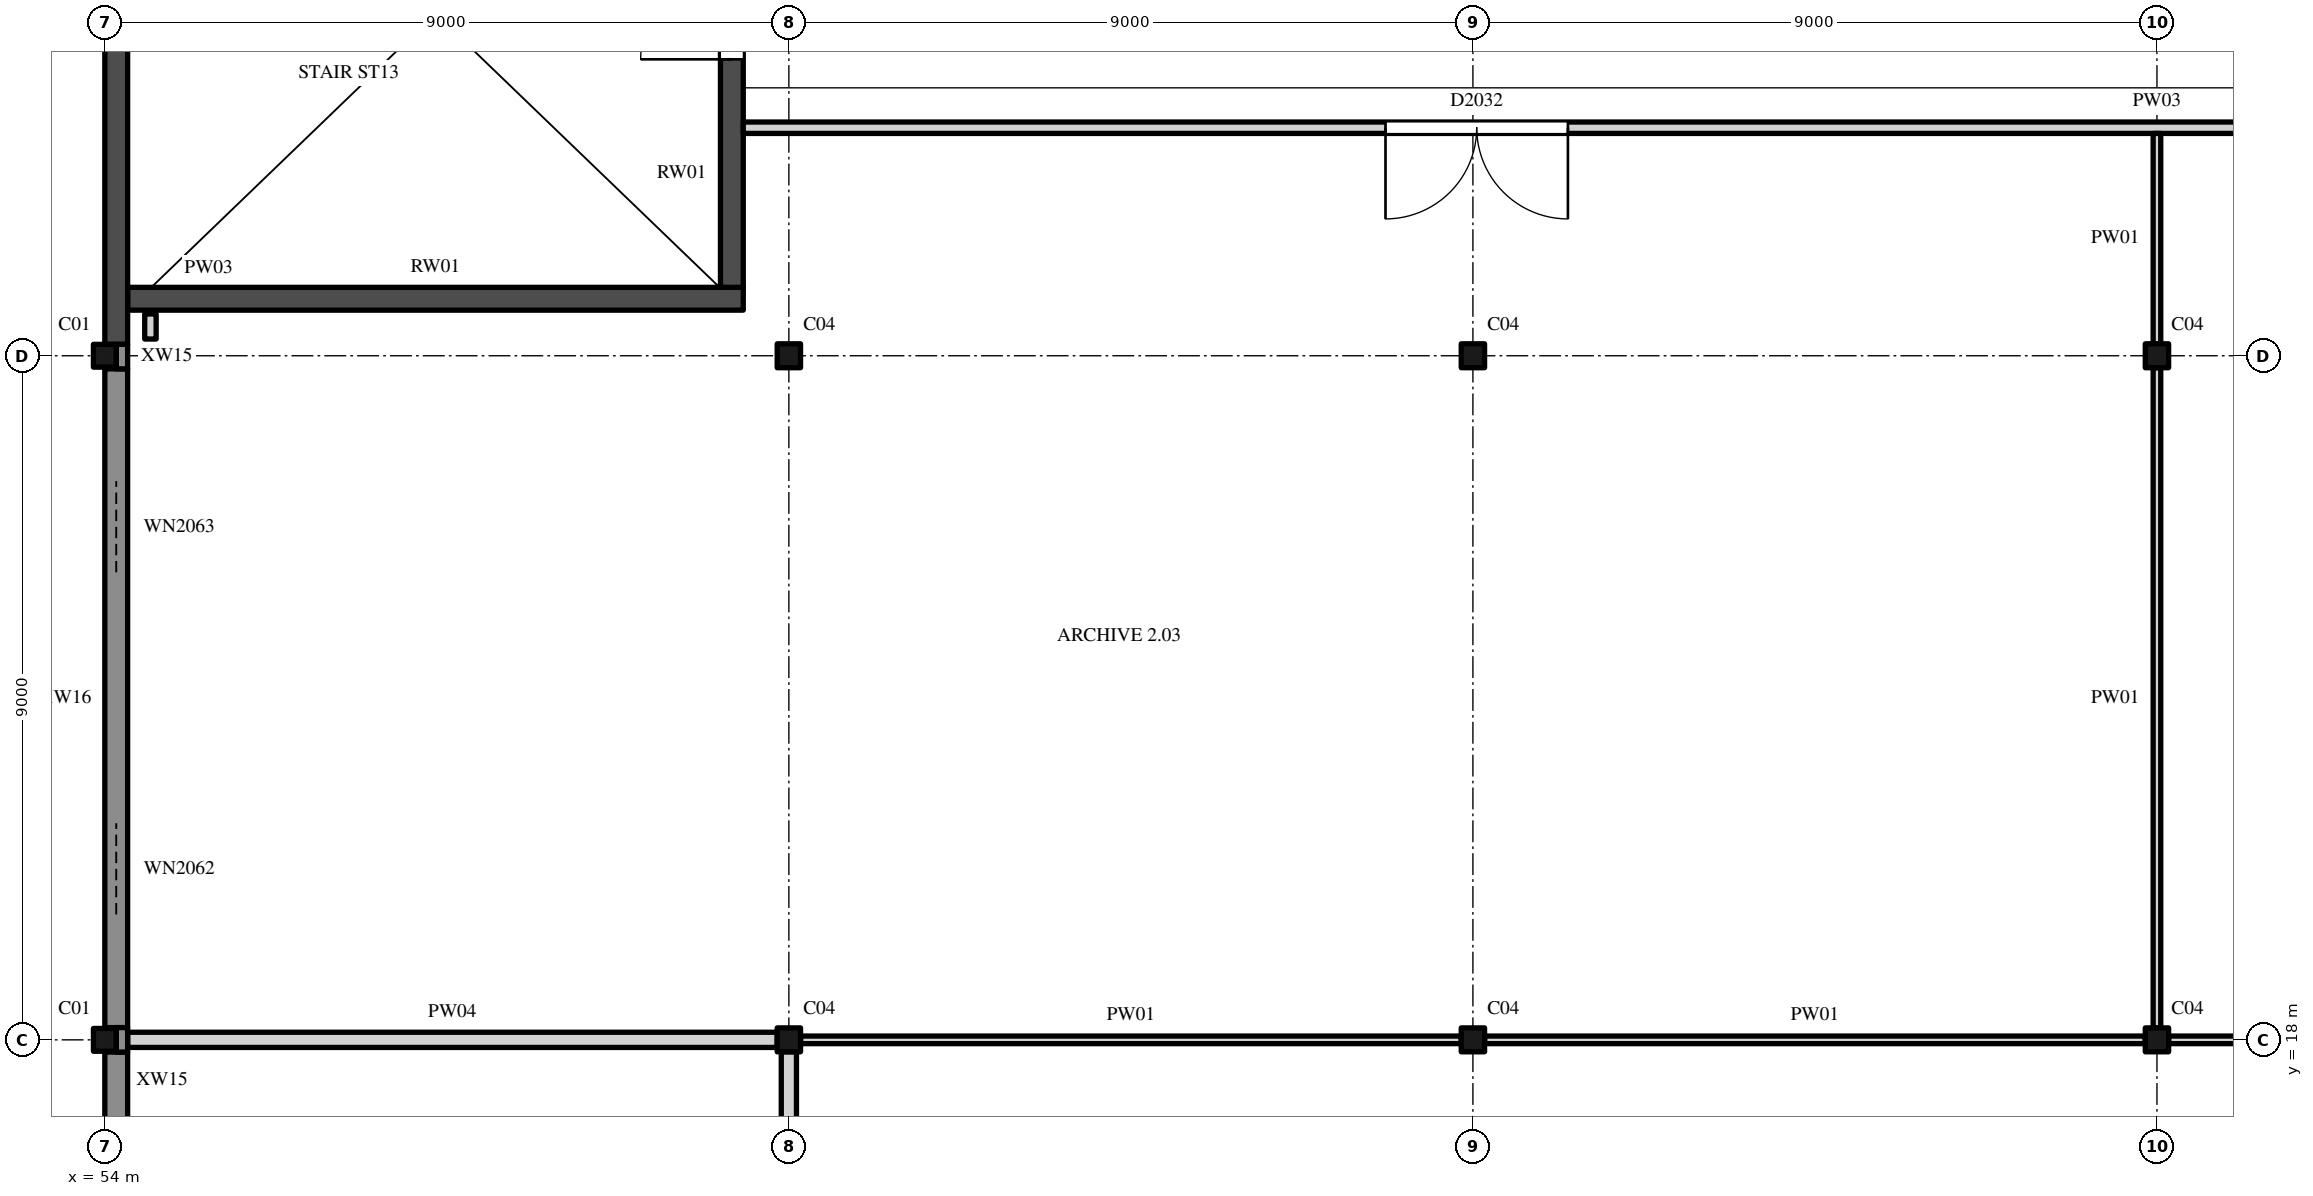
"""IFC4 building model, lengths in metres.
Left out: names, types, materials, properties, quantities, classifications, styles, units other than length and angle.
Written with IfcOpenShell. Run it as: python <this file> out.ifc"""

import sys

from ifc_helpers import new_model, si_unit, direction, frame, frame_2d, origin, origin_2d, place, context, subcontext, project, spatial, rectangle, hollow_rectangle, i_section, extrude, element, fill, save


model = new_model("IFC4")
c1 = context("Model", 3, precision=1e-05, world=origin(), true_north=direction((0.0, 1.0)))
c2 = subcontext(c1, "Body", "Model", "MODEL_VIEW")
j1 = project(units=[si_unit("LENGTHUNIT", "METRE"), si_unit("PLANEANGLEUNIT", "RADIAN")], contexts=[c1])
p1 = place(None, origin())
s1 = spatial("IfcSite", under=j1, at=p1, CompositionType="ELEMENT")
p2 = place(p1, origin())
s2 = spatial("IfcBuilding", under=s1, at=p2, CompositionType="ELEMENT")
p3 = place(p2, frame((0.0, 0.0, 11.0)))
s3 = spatial("IfcBuildingStorey", under=s2, at=p3, CompositionType="ELEMENT", Elevation=11.0)
p4 = place(p3, frame((54.0, 18.0, 0.0), z_axis=(0.0, 0.0, 1.0), x_axis=(1.0, 0.0, 0.0)))
e1 = element("IfcColumn", 1, at=p4, inside=s3, PredefinedType="COLUMN", context=c2, shape_type="SweptSolid", body=[
    extrude(hollow_rectangle(XDim=0.3, YDim=0.3, WallThickness=0.012, InnerFilletRadius=0.019, OuterFilletRadius=0.031, at=origin_2d()), origin(), (0.0, 0.0, 1.0), 5.0),
])
for number, where, z_axis, x_axis in (
    (2, (63.0, 18.0, 0.0), (0.0, 0.0, 1.0), (1.0, 0.0, 0.0)),
    (3, (72.0, 18.0, 0.0), (0.0, 0.0, 1.0), (1.0, 0.0, 0.0)),
    (4, (81.0, 18.0, 0.0), (0.0, 0.0, 1.0), (1.0, 0.0, 0.0)),
):
    element("IfcColumn", number, at=place(p3, frame(where, z_axis=z_axis, x_axis=x_axis)), inside=s3, PredefinedType="COLUMN", context=c2, shape_type="SweptSolid", body=[
        extrude(i_section(OverallWidth=0.307, OverallDepth=0.315, WebThickness=0.012, FlangeThickness=0.019, FilletRadius=0.017, at=origin_2d()), origin(), (0.0, 0.0, 1.0), 5.0),
    ])
p5 = place(p3, frame((54.0, 27.0, 0.0), z_axis=(0.0, 0.0, 1.0), x_axis=(1.0, 0.0, 0.0)))
e5 = element("IfcColumn", 5, at=p5, inside=s3, PredefinedType="COLUMN", context=c2, shape_type="SweptSolid", body=[
    extrude(hollow_rectangle(XDim=0.3, YDim=0.3, WallThickness=0.012, InnerFilletRadius=0.019, OuterFilletRadius=0.031, at=origin_2d()), origin(), (0.0, 0.0, 1.0), 5.0),
])
for number, where, z_axis, x_axis in (
    (6, (63.0, 27.0, 0.0), (0.0, 0.0, 1.0), (1.0, 0.0, 0.0)),
    (7, (72.0, 27.0, 0.0), (0.0, 0.0, 1.0), (1.0, 0.0, 0.0)),
    (8, (81.0, 27.0, 0.0), (0.0, 0.0, 1.0), (1.0, 0.0, 0.0)),
):
    element("IfcColumn", number, at=place(p3, frame(where, z_axis=z_axis, x_axis=x_axis)), inside=s3, PredefinedType="COLUMN", context=c2, shape_type="SweptSolid", body=[
        extrude(i_section(OverallWidth=0.307, OverallDepth=0.315, WebThickness=0.012, FlangeThickness=0.019, FilletRadius=0.017, at=origin_2d()), origin(), (0.0, 0.0, 1.0), 5.0),
    ])
p6 = place(p3, frame((54.3, 27.75, 0.0), z_axis=(0.0, 0.0, 1.0), x_axis=(1.0, 0.0, 0.0)))
e9 = element("IfcWall", 9, at=p6, inside=s3, PredefinedType="SHEAR", context=c2, shape_type="SweptSolid", body=[
    extrude(rectangle(XDim=8.1, YDim=0.3, at=frame_2d((4.05, 0.0))), origin(), (0.0, 0.0, 1.0), 4.825),
])
p7 = place(p3, frame((54.15, 27.15, 0.0), z_axis=(0.0, 0.0, 1.0), x_axis=(0.0, 1.0, 0.0)))
e10 = element("IfcWall", 10, at=p7, inside=s3, PredefinedType="SHEAR", context=c2, shape_type="SweptSolid", body=[
    extrude(rectangle(XDim=8.7, YDim=0.3, at=frame_2d((4.35, 0.0))), origin(), (0.0, 0.0, 1.0), 4.825),
])
p8 = place(p3, frame((62.25, 27.9, 0.0), z_axis=(0.0, 0.0, 1.0), x_axis=(0.0, 1.0, 0.0)))
e11 = element("IfcWall", 11, at=p8, inside=s3, PredefinedType="SHEAR", context=c2, shape_type="SweptSolid", body=[
    extrude(rectangle(XDim=7.2, YDim=0.3, at=frame_2d((3.6, 0.0))), origin(), (0.0, 0.0, 1.0), 4.825),
])
p9 = place(p8, frame((3.0, 0.0, 0.0)))
e12 = element("IfcOpeningElement", 12, at=p9, cuts=e11, PredefinedType="OPENING", context=c2, shape_type="SweptSolid", body=[
    extrude(rectangle(XDim=1.2, YDim=2.1, at=frame_2d((0.6, 1.05))), frame((0.0, 0.16, 0.0), z_axis=(0.0, -1.0, 0.0), x_axis=(1.0, 0.0, 0.0)), (0.0, 0.0, 1.0), 0.32),
])
p10 = place(p3, frame((54.15, 9.172, 0.0), z_axis=(0.0, 0.0, 1.0), x_axis=(0.0, 1.0, 0.0)))
e13 = element("IfcWall", 13, at=p10, inside=s3, PredefinedType="SOLIDWALL", context=c2, shape_type="SweptSolid", body=[
    extrude(rectangle(XDim=8.667, YDim=0.3, at=frame_2d((4.333, 0.0))), origin(), (0.0, 0.0, 1.0), 4.825),
])
p11 = place(p10, frame((3.128, 0.0, 0.9)))
e14 = element("IfcOpeningElement", 14, at=p11, cuts=e13, PredefinedType="OPENING", context=c2, shape_type="SweptSolid", body=[
    extrude(rectangle(XDim=2.4, YDim=1.8, at=frame_2d((1.2, 0.9))), frame((0.0, 0.16, 0.0), z_axis=(0.0, -1.0, 0.0), x_axis=(1.0, 0.0, 0.0)), (0.0, 0.0, 1.0), 0.32),
])
p12 = place(p3, frame((54.15, 18.161, 0.0), z_axis=(0.0, 0.0, 1.0), x_axis=(0.0, 1.0, 0.0)))
e15 = element("IfcWall", 15, at=p12, inside=s3, PredefinedType="SOLIDWALL", context=c2, shape_type="SweptSolid", body=[
    extrude(rectangle(XDim=8.667, YDim=0.3, at=frame_2d((4.333, 0.0))), origin(), (0.0, 0.0, 1.0), 4.825),
])
p13 = place(p12, frame((1.489, 0.0, 1.2)))
e16 = element("IfcOpeningElement", 16, at=p13, cuts=e15, PredefinedType="OPENING", context=c2, shape_type="SweptSolid", body=[
    extrude(rectangle(XDim=1.2, YDim=1.5, at=frame_2d((0.6, 0.75))), frame((0.0, 0.16, 0.0), z_axis=(0.0, -1.0, 0.0), x_axis=(1.0, 0.0, 0.0)), (0.0, 0.0, 1.0), 0.32),
])
p14 = place(p12, frame((5.989, 0.0, 1.2)))
e17 = element("IfcOpeningElement", 17, at=p14, cuts=e15, PredefinedType="OPENING", context=c2, shape_type="SweptSolid", body=[
    extrude(rectangle(XDim=1.2, YDim=1.5, at=frame_2d((0.6, 0.75))), frame((0.0, 0.16, 0.0), z_axis=(0.0, -1.0, 0.0), x_axis=(1.0, 0.0, 0.0)), (0.0, 0.0, 1.0), 0.32),
])
p15 = place(p3, frame((54.225, 17.839, 0.0), z_axis=(0.0, 0.0, 1.0), x_axis=(0.0, 1.0, 0.0)))
e18 = element("IfcWall", 18, at=p15, inside=s3, PredefinedType="SOLIDWALL", context=c2, shape_type="SweptSolid", body=[
    extrude(rectangle(XDim=0.322, YDim=0.15, at=frame_2d((0.161, 0.0))), origin(), (0.0, 0.0, 1.0), 4.825),
])
p16 = place(p3, frame((54.225, 26.828, 0.0), z_axis=(0.0, 0.0, 1.0), x_axis=(0.0, 1.0, 0.0)))
e19 = element("IfcWall", 19, at=p16, inside=s3, PredefinedType="SOLIDWALL", context=c2, shape_type="SweptSolid", body=[
    extrude(rectangle(XDim=0.322, YDim=0.15, at=frame_2d((0.161, 0.0))), origin(), (0.0, 0.0, 1.0), 4.825),
])
for number, where, z_axis, x_axis in (
    (20, (55.5, 20.325, 5.0), (0.0, 0.0, 1.0), (1.0, 0.0, 0.0)),
    (21, (55.5, 24.675, 5.0), (0.0, 0.0, 1.0), (1.0, 0.0, 0.0)),
):
    element("IfcWall", number, at=place(p3, frame(where, z_axis=z_axis, x_axis=x_axis)), inside=s3, PredefinedType="PARAPET", context=c2, shape_type="SweptSolid", body=[
        extrude(rectangle(XDim=6.0, YDim=0.15, at=frame_2d((3.0, 0.0))), origin(), (0.0, 0.0, 1.0), 0.5),
    ])
for number, where, z_axis, x_axis in (
    (22, (55.575, 20.4, 5.0), (0.0, 0.0, 1.0), (0.0, 1.0, 0.0)),
    (23, (61.425, 20.4, 5.0), (0.0, 0.0, 1.0), (0.0, 1.0, 0.0)),
):
    element("IfcWall", number, at=place(p3, frame(where, z_axis=z_axis, x_axis=x_axis)), inside=s3, PredefinedType="PARAPET", context=c2, shape_type="SweptSolid", body=[
        extrude(rectangle(XDim=4.2, YDim=0.15, at=frame_2d((2.1, 0.0))), origin(), (0.0, 0.0, 1.0), 0.5),
    ])
for number, where, z_axis, x_axis in (
    (24, (64.5, 20.325, 5.0), (0.0, 0.0, 1.0), (1.0, 0.0, 0.0)),
    (25, (64.5, 24.675, 5.0), (0.0, 0.0, 1.0), (1.0, 0.0, 0.0)),
):
    element("IfcWall", number, at=place(p3, frame(where, z_axis=z_axis, x_axis=x_axis)), inside=s3, PredefinedType="PARAPET", context=c2, shape_type="SweptSolid", body=[
        extrude(rectangle(XDim=6.0, YDim=0.15, at=frame_2d((3.0, 0.0))), origin(), (0.0, 0.0, 1.0), 0.5),
    ])
for number, where, z_axis, x_axis in (
    (26, (64.575, 20.4, 5.0), (0.0, 0.0, 1.0), (0.0, 1.0, 0.0)),
    (27, (70.425, 20.4, 5.0), (0.0, 0.0, 1.0), (0.0, 1.0, 0.0)),
):
    element("IfcWall", number, at=place(p3, frame(where, z_axis=z_axis, x_axis=x_axis)), inside=s3, PredefinedType="PARAPET", context=c2, shape_type="SweptSolid", body=[
        extrude(rectangle(XDim=4.2, YDim=0.15, at=frame_2d((2.1, 0.0))), origin(), (0.0, 0.0, 1.0), 0.5),
    ])
for number, where, z_axis, x_axis in (
    (28, (73.5, 20.325, 5.0), (0.0, 0.0, 1.0), (1.0, 0.0, 0.0)),
    (29, (73.5, 24.675, 5.0), (0.0, 0.0, 1.0), (1.0, 0.0, 0.0)),
):
    element("IfcWall", number, at=place(p3, frame(where, z_axis=z_axis, x_axis=x_axis)), inside=s3, PredefinedType="PARAPET", context=c2, shape_type="SweptSolid", body=[
        extrude(rectangle(XDim=6.0, YDim=0.15, at=frame_2d((3.0, 0.0))), origin(), (0.0, 0.0, 1.0), 0.5),
    ])
for number, where, z_axis, x_axis in (
    (30, (73.575, 20.4, 5.0), (0.0, 0.0, 1.0), (0.0, 1.0, 0.0)),
    (31, (79.425, 20.4, 5.0), (0.0, 0.0, 1.0), (0.0, 1.0, 0.0)),
):
    element("IfcWall", number, at=place(p3, frame(where, z_axis=z_axis, x_axis=x_axis)), inside=s3, PredefinedType="PARAPET", context=c2, shape_type="SweptSolid", body=[
        extrude(rectangle(XDim=4.2, YDim=0.15, at=frame_2d((2.1, 0.0))), origin(), (0.0, 0.0, 1.0), 0.5),
    ])
p17 = place(p3, frame((55.5, 29.325, 5.0), z_axis=(0.0, 0.0, 1.0), x_axis=(1.0, 0.0, 0.0)))
e32 = element("IfcWall", 32, at=p17, inside=s3, PredefinedType="PARAPET", context=c2, shape_type="SweptSolid", body=[
    extrude(rectangle(XDim=6.0, YDim=0.15, at=frame_2d((3.0, 0.0))), origin(), (0.0, 0.0, 1.0), 0.5),
])
for number, where, z_axis, x_axis in (
    (33, (55.575, 29.4, 5.0), (0.0, 0.0, 1.0), (0.0, 1.0, 0.0)),
    (34, (61.425, 29.4, 5.0), (0.0, 0.0, 1.0), (0.0, 1.0, 0.0)),
):
    element("IfcWall", number, at=place(p3, frame(where, z_axis=z_axis, x_axis=x_axis)), inside=s3, PredefinedType="PARAPET", context=c2, shape_type="SweptSolid", body=[
        extrude(rectangle(XDim=4.2, YDim=0.15, at=frame_2d((2.1, 0.0))), origin(), (0.0, 0.0, 1.0), 0.5),
    ])
p18 = place(p3, frame((64.5, 29.325, 5.0), z_axis=(0.0, 0.0, 1.0), x_axis=(1.0, 0.0, 0.0)))
e35 = element("IfcWall", 35, at=p18, inside=s3, PredefinedType="PARAPET", context=c2, shape_type="SweptSolid", body=[
    extrude(rectangle(XDim=6.0, YDim=0.15, at=frame_2d((3.0, 0.0))), origin(), (0.0, 0.0, 1.0), 0.5),
])
for number, where, z_axis, x_axis in (
    (36, (64.575, 29.4, 5.0), (0.0, 0.0, 1.0), (0.0, 1.0, 0.0)),
    (37, (70.425, 29.4, 5.0), (0.0, 0.0, 1.0), (0.0, 1.0, 0.0)),
):
    element("IfcWall", number, at=place(p3, frame(where, z_axis=z_axis, x_axis=x_axis)), inside=s3, PredefinedType="PARAPET", context=c2, shape_type="SweptSolid", body=[
        extrude(rectangle(XDim=4.2, YDim=0.15, at=frame_2d((2.1, 0.0))), origin(), (0.0, 0.0, 1.0), 0.5),
    ])
p19 = place(p3, frame((73.5, 29.325, 5.0), z_axis=(0.0, 0.0, 1.0), x_axis=(1.0, 0.0, 0.0)))
e38 = element("IfcWall", 38, at=p19, inside=s3, PredefinedType="PARAPET", context=c2, shape_type="SweptSolid", body=[
    extrude(rectangle(XDim=6.0, YDim=0.15, at=frame_2d((3.0, 0.0))), origin(), (0.0, 0.0, 1.0), 0.5),
])
for number, where, z_axis, x_axis in (
    (39, (73.575, 29.4, 5.0), (0.0, 0.0, 1.0), (0.0, 1.0, 0.0)),
    (40, (79.425, 29.4, 5.0), (0.0, 0.0, 1.0), (0.0, 1.0, 0.0)),
):
    element("IfcWall", number, at=place(p3, frame(where, z_axis=z_axis, x_axis=x_axis)), inside=s3, PredefinedType="PARAPET", context=c2, shape_type="SweptSolid", body=[
        extrude(rectangle(XDim=4.2, YDim=0.15, at=frame_2d((2.1, 0.0))), origin(), (0.0, 0.0, 1.0), 0.5),
    ])
p20 = place(p3, frame((54.3, 18.0, 0.0), z_axis=(0.0, 0.0, 1.0), x_axis=(1.0, 0.0, 0.0)))
e41 = element("IfcWall", 41, at=p20, inside=s3, PredefinedType="PARTITIONING", context=c2, shape_type="SweptSolid", body=[
    extrude(rectangle(XDim=8.546, YDim=0.2, at=frame_2d((4.273, 0.0))), origin(), (0.0, 0.0, 1.0), 4.419),
])
for number, where, z_axis, x_axis in (
    (42, (63.154, 18.0, 0.0), (0.0, 0.0, 1.0), (1.0, 0.0, 0.0)),
    (43, (72.154, 18.0, 0.0), (0.0, 0.0, 1.0), (1.0, 0.0, 0.0)),
    (44, (81.154, 18.0, 0.0), (0.0, 0.0, 1.0), (1.0, 0.0, 0.0)),
):
    element("IfcWall", number, at=place(p3, frame(where, z_axis=z_axis, x_axis=x_axis)), inside=s3, PredefinedType="PARTITIONING", context=c2, shape_type="SweptSolid", body=[
        extrude(rectangle(XDim=8.693, YDim=0.1, at=frame_2d((4.346, 0.0))), origin(), (0.0, 0.0, 1.0), 4.419),
    ])
p21 = place(p3, frame((62.4, 30.0, 0.0), z_axis=(0.0, 0.0, 1.0), x_axis=(1.0, 0.0, 0.0)))
e45 = element("IfcWall", 45, at=p21, inside=s3, PredefinedType="PARTITIONING", context=c2, shape_type="SweptSolid", body=[
    extrude(rectangle(XDim=36.675, YDim=0.15, at=frame_2d((18.337, 0.0))), origin(), (0.0, 0.0, 1.0), 4.422),
])
p22 = place(p21, frame((8.45, 0.0, 0.0)))
e46 = element("IfcOpeningElement", 46, at=p22, cuts=e45, PredefinedType="OPENING", context=c2, shape_type="SweptSolid", body=[
    extrude(rectangle(XDim=2.4, YDim=3.0, at=frame_2d((1.2, 1.5))), frame((0.0, 0.085, 0.0), z_axis=(0.0, -1.0, 0.0), x_axis=(1.0, 0.0, 0.0)), (0.0, 0.0, 1.0), 0.17),
])
p23 = place(p21, frame((26.35, 0.0, 0.0)))
e47 = element("IfcOpeningElement", 47, at=p23, cuts=e45, PredefinedType="OPENING", context=c2, shape_type="SweptSolid", body=[
    extrude(rectangle(XDim=2.4, YDim=3.0, at=frame_2d((1.2, 1.5))), frame((0.0, 0.085, 0.0), z_axis=(0.0, -1.0, 0.0), x_axis=(1.0, 0.0, 0.0)), (0.0, 0.0, 1.0), 0.17),
])
p24 = place(p3, frame((54.6, 27.22, 0.0), z_axis=(0.0, 0.0, 1.0), x_axis=(0.0, 1.0, 0.0)))
e48 = element("IfcWall", 48, at=p24, inside=s3, PredefinedType="PARTITIONING", context=c2, shape_type="SweptSolid", body=[
    extrude(rectangle(XDim=0.33, YDim=0.15, at=frame_2d((0.165, 0.0))), origin(), (0.0, 0.0, 1.0), 4.825),
])
p25 = place(p3, frame((63.0, 9.157, 0.0), z_axis=(0.0, 0.0, 1.0), x_axis=(0.0, 1.0, 0.0)))
e49 = element("IfcWall", 49, at=p25, inside=s3, PredefinedType="PARTITIONING", context=c2, shape_type="SweptSolid", body=[
    extrude(rectangle(XDim=8.686, YDim=0.2, at=frame_2d((4.343, 0.0))), origin(), (0.0, 0.0, 1.0), 4.297),
])
p26 = place(p25, frame((0.65, 0.0, 0.0)))
e50 = element("IfcOpeningElement", 50, at=p26, cuts=e49, PredefinedType="OPENING", context=c2, shape_type="SweptSolid", body=[
    extrude(rectangle(XDim=1.5, YDim=2.4, at=frame_2d((0.75, 1.2))), frame((0.0, 0.11, 0.0), z_axis=(0.0, -1.0, 0.0), x_axis=(1.0, 0.0, 0.0)), (0.0, 0.0, 1.0), 0.22),
])
p27 = place(p3, frame((81.0, 18.157, 0.0), z_axis=(0.0, 0.0, 1.0), x_axis=(0.0, 1.0, 0.0)))
e51 = element("IfcWall", 51, at=p27, inside=s3, PredefinedType="PARTITIONING", context=c2, shape_type="SweptSolid", body=[
    extrude(rectangle(XDim=8.686, YDim=0.1, at=frame_2d((4.343, 0.0))), origin(), (0.0, 0.0, 1.0), 4.297),
])
p28 = place(p3, frame((81.0, 27.157, 0.0), z_axis=(0.0, 0.0, 1.0), x_axis=(0.0, 1.0, 0.0)))
e52 = element("IfcWall", 52, at=p28, inside=s3, PredefinedType="PARTITIONING", context=c2, shape_type="SweptSolid", body=[
    extrude(rectangle(XDim=2.768, YDim=0.1, at=frame_2d((1.384, 0.0))), origin(), (0.0, 0.0, 1.0), 4.297),
])
p29 = place(p9, origin())
e53 = element("IfcDoor", 53, at=p29, inside=s3, OperationType="SINGLE_SWING_RIGHT", PredefinedType="DOOR", context=c2, shape_type="SweptSolid", body=[
    extrude(rectangle(XDim=1.2, YDim=2.1, at=frame_2d((0.6, 1.05))), frame((0.0, 0.025, 0.0), z_axis=(0.0, -1.0, 0.0), x_axis=(1.0, 0.0, 0.0)), (0.0, 0.0, 1.0), 0.05),
])
fill(e12, e53)
p30 = place(p13, origin())
e54 = element("IfcWindow", 54, at=p30, inside=s3, PartitioningType="SINGLE_PANEL", PredefinedType="WINDOW", context=c2, shape_type="SweptSolid", body=[
    extrude(rectangle(XDim=1.2, YDim=1.5, at=frame_2d((0.6, 0.75))), frame((0.0, 0.03, 0.0), z_axis=(0.0, -1.0, 0.0), x_axis=(1.0, 0.0, 0.0)), (0.0, 0.0, 1.0), 0.06),
])
fill(e16, e54)
p31 = place(p14, origin())
e55 = element("IfcWindow", 55, at=p31, inside=s3, PartitioningType="SINGLE_PANEL", PredefinedType="WINDOW", context=c2, shape_type="SweptSolid", body=[
    extrude(rectangle(XDim=1.2, YDim=1.5, at=frame_2d((0.6, 0.75))), frame((0.0, 0.03, 0.0), z_axis=(0.0, -1.0, 0.0), x_axis=(1.0, 0.0, 0.0)), (0.0, 0.0, 1.0), 0.06),
])
fill(e17, e55)
p32 = place(p22, origin())
e56 = element("IfcDoor", 56, at=p32, inside=s3, OperationType="DOUBLE_DOOR_SINGLE_SWING", PredefinedType="DOOR", context=c2, shape_type="SweptSolid", body=[
    extrude(rectangle(XDim=2.4, YDim=3.0, at=frame_2d((1.2, 1.5))), frame((0.0, 0.025, 0.0), z_axis=(0.0, -1.0, 0.0), x_axis=(1.0, 0.0, 0.0)), (0.0, 0.0, 1.0), 0.05),
])
fill(e46, e56)
save(model, sys.argv[1])
